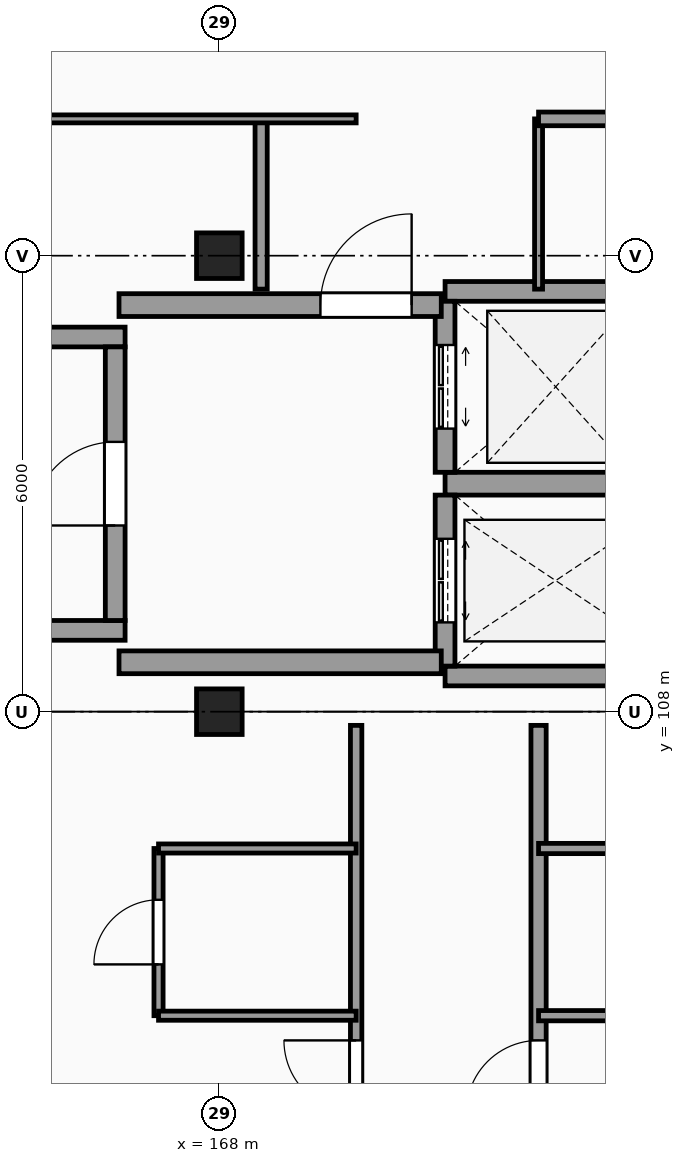
"""IFC4 building model, lengths in metres.
Left out: names, types, materials, properties, quantities, classifications, styles, units other than length and angle.
Written with IfcOpenShell. Run it as: python <this file> out.ifc"""

import sys

from ifc_helpers import new_model, si_unit, direction, frame, frame_2d, origin, origin_2d, place, context, subcontext, project, spatial, rectangle, extrude, element, fill, save


model = new_model("IFC4")
c1 = context("Model", 3, precision=1e-05, world=origin(), true_north=direction((0.0, 1.0)))
c2 = subcontext(c1, "Body", "Model", "MODEL_VIEW")
j1 = project(units=[si_unit("LENGTHUNIT", "METRE"), si_unit("PLANEANGLEUNIT", "RADIAN")], contexts=[c1])
p1 = place(None, origin())
s1 = spatial("IfcSite", under=j1, at=p1, CompositionType="ELEMENT")
p2 = place(p1, origin())
s2 = spatial("IfcBuilding", under=s1, at=p2, CompositionType="ELEMENT")
p3 = place(p2, frame((0.0, 0.0, 34.8)))
s3 = spatial("IfcBuildingStorey", under=s2, at=p3, CompositionType="ELEMENT", Elevation=34.8)
for number, where, z_axis, x_axis in (
    (1, (168.0, 108.0, 0.0), (0.0, 0.0, 1.0), (1.0, 0.0, 0.0)),
    (2, (168.0, 114.0, 0.0), (0.0, 0.0, 1.0), (1.0, 0.0, 0.0)),
):
    element("IfcColumn", number, at=place(p3, frame(where, z_axis=z_axis, x_axis=x_axis)), inside=s3, PredefinedType="COLUMN", context=c2, shape_type="SweptSolid", body=[
        extrude(rectangle(XDim=0.6, YDim=0.6, at=origin_2d()), origin(), (0.0, 0.0, 1.0), 3.3),
    ])
for number, where, z_axis, x_axis in (
    (3, (156.04, 109.07, 0.0), (0.0, 0.0, 1.0), (1.0, 0.0, 0.0)),
    (4, (156.04, 112.93, 0.0), (0.0, 0.0, 1.0), (1.0, 0.0, 0.0)),
):
    element("IfcWall", number, at=place(p3, frame(where, z_axis=z_axis, x_axis=x_axis)), inside=s3, PredefinedType="SHEAR", context=c2, shape_type="SweptSolid", body=[
        extrude(rectangle(XDim=10.72, YDim=0.26, at=frame_2d((5.36, 0.0))), origin(), (0.0, 0.0, 1.0), 3.3),
    ])
p4 = place(p3, frame((166.63, 109.2, 0.0), z_axis=(0.0, 0.0, 1.0), x_axis=(0.0, 1.0, 0.0)))
e5 = element("IfcWall", 5, at=p4, inside=s3, PredefinedType="SHEAR", context=c2, shape_type="SweptSolid", body=[
    extrude(rectangle(XDim=3.6, YDim=0.26, at=frame_2d((1.8, 0.0))), origin(), (0.0, 0.0, 1.0), 3.3),
])
p5 = place(p4, frame((1.25, 0.0, 0.0)))
e6 = element("IfcOpeningElement", 6, at=p5, cuts=e5, PredefinedType="OPENING", context=c2, shape_type="SweptSolid", body=[
    extrude(rectangle(XDim=1.1, YDim=2.15, at=frame_2d((0.55, 1.075))), frame((0.0, 0.14, 0.0), z_axis=(0.0, -1.0, 0.0), x_axis=(1.0, 0.0, 0.0)), (0.0, 0.0, 1.0), 0.28),
])
p6 = place(p3, frame((170.97, 108.47, 0.0), z_axis=(0.0, 0.0, 1.0), x_axis=(1.0, 0.0, 0.0)))
e7 = element("IfcWall", 7, at=p6, inside=s3, PredefinedType="SHEAR", context=c2, shape_type="SweptSolid", body=[
    extrude(rectangle(XDim=2.91, YDim=0.26, at=frame_2d((1.455, 0.0))), origin(), (0.0, 0.0, 1.0), 3.3),
])
p7 = place(p3, frame((170.97, 111.0, 0.0), z_axis=(0.0, 0.0, 1.0), x_axis=(1.0, 0.0, 0.0)))
e8 = element("IfcWall", 8, at=p7, inside=s3, PredefinedType="SHEAR", context=c2, shape_type="SweptSolid", body=[
    extrude(rectangle(XDim=2.91, YDim=0.3, at=frame_2d((1.455, 0.0))), origin(), (0.0, 0.0, 1.0), 3.3),
])
p8 = place(p3, frame((170.97, 108.6, 0.0), z_axis=(0.0, 0.0, 1.0), x_axis=(0.0, 1.0, 0.0)))
e9 = element("IfcWall", 9, at=p8, inside=s3, PredefinedType="SHEAR", context=c2, shape_type="SweptSolid", body=[
    extrude(rectangle(XDim=2.25, YDim=0.26, at=frame_2d((1.125, 0.0))), origin(), (0.0, 0.0, 1.0), 3.3),
])
p9 = place(p8, frame((0.575, 0.0, 0.0)))
e10 = element("IfcOpeningElement", 10, at=p9, cuts=e9, PredefinedType="OPENING", context=c2, shape_type="SweptSolid", body=[
    extrude(rectangle(XDim=1.1, YDim=2.2, at=frame_2d((0.55, 1.1))), frame((0.0, 0.14, 0.0), z_axis=(0.0, -1.0, 0.0), x_axis=(1.0, 0.0, 0.0)), (0.0, 0.0, 1.0), 0.28),
])
p10 = place(p3, frame((170.97, 113.53, 0.0), z_axis=(0.0, 0.0, 1.0), x_axis=(1.0, 0.0, 0.0)))
e11 = element("IfcWall", 11, at=p10, inside=s3, PredefinedType="SHEAR", context=c2, shape_type="SweptSolid", body=[
    extrude(rectangle(XDim=2.91, YDim=0.26, at=frame_2d((1.455, 0.0))), origin(), (0.0, 0.0, 1.0), 3.3),
])
p11 = place(p3, frame((170.97, 111.15, 0.0), z_axis=(0.0, 0.0, 1.0), x_axis=(0.0, 1.0, 0.0)))
e12 = element("IfcWall", 12, at=p11, inside=s3, PredefinedType="SHEAR", context=c2, shape_type="SweptSolid", body=[
    extrude(rectangle(XDim=2.25, YDim=0.26, at=frame_2d((1.125, 0.0))), origin(), (0.0, 0.0, 1.0), 3.3),
])
p12 = place(p11, frame((0.575, 0.0, 0.0)))
e13 = element("IfcOpeningElement", 13, at=p12, cuts=e12, PredefinedType="OPENING", context=c2, shape_type="SweptSolid", body=[
    extrude(rectangle(XDim=1.1, YDim=2.2, at=frame_2d((0.55, 1.1))), frame((0.0, 0.14, 0.0), z_axis=(0.0, -1.0, 0.0), x_axis=(1.0, 0.0, 0.0)), (0.0, 0.0, 1.0), 0.28),
])
p13 = place(p3, frame((166.68, 113.35, 0.0), z_axis=(0.0, 0.0, 1.0), x_axis=(1.0, 0.0, 0.0)))
e14 = element("IfcWall", 14, at=p13, inside=s3, PredefinedType="SHEAR", context=c2, shape_type="SweptSolid", body=[
    extrude(rectangle(XDim=4.24, YDim=0.3, at=frame_2d((2.12, 0.0))), origin(), (0.0, 0.0, 1.0), 3.3),
])
p14 = place(p13, frame((2.65, 0.0, 0.0)))
e15 = element("IfcOpeningElement", 15, at=p14, cuts=e14, PredefinedType="OPENING", context=c2, shape_type="SweptSolid", body=[
    extrude(rectangle(XDim=1.2, YDim=2.2, at=frame_2d((0.6, 1.1))), frame((0.0, 0.16, 0.0), z_axis=(0.0, -1.0, 0.0), x_axis=(1.0, 0.0, 0.0)), (0.0, 0.0, 1.0), 0.32),
])
p15 = place(p3, frame((166.68, 108.65, 0.0), z_axis=(0.0, 0.0, 1.0), x_axis=(1.0, 0.0, 0.0)))
e16 = element("IfcWall", 16, at=p15, inside=s3, PredefinedType="SHEAR", context=c2, shape_type="SweptSolid", body=[
    extrude(rectangle(XDim=4.24, YDim=0.3, at=frame_2d((2.12, 0.0))), origin(), (0.0, 0.0, 1.0), 3.3),
])
p16 = place(p3, frame((167.2, 104.0, 0.0), z_axis=(0.0, 0.0, 1.0), x_axis=(0.0, 1.0, 0.0)))
e17 = element("IfcWall", 17, at=p16, inside=s3, PredefinedType="PARTITIONING", context=c2, shape_type="SweptSolid", body=[
    extrude(rectangle(XDim=2.2, YDim=0.12, at=frame_2d((1.1, 0.0))), origin(), (0.0, 0.0, 1.0), 3.07),
])
p17 = place(p16, frame((0.675, 0.0, 0.0)))
e18 = element("IfcOpeningElement", 18, at=p17, cuts=e17, PredefinedType="OPENING", context=c2, shape_type="SweptSolid", body=[
    extrude(rectangle(XDim=0.85, YDim=2.1, at=frame_2d((0.425, 1.05))), frame((0.0, 0.07, 0.0), z_axis=(0.0, -1.0, 0.0), x_axis=(1.0, 0.0, 0.0)), (0.0, 0.0, 1.0), 0.14),
])
p18 = place(p3, frame((168.55, 113.56, 0.0), z_axis=(0.0, 0.0, 1.0), x_axis=(0.0, 1.0, 0.0)))
e19 = element("IfcWall", 19, at=p18, inside=s3, PredefinedType="PARTITIONING", context=c2, shape_type="SweptSolid", body=[
    extrude(rectangle(XDim=2.24, YDim=0.16, at=frame_2d((1.12, 0.0))), origin(), (0.0, 0.0, 1.0), 3.07),
])
p19 = place(p3, frame((169.8, 42.235, 0.0), z_axis=(0.0, 0.0, 1.0), x_axis=(0.0, 1.0, 0.0)))
e20 = element("IfcWall", 20, at=p19, inside=s3, PredefinedType="PARTITIONING", context=c2, shape_type="SweptSolid", body=[
    extrude(rectangle(XDim=65.585, YDim=0.15, at=frame_2d((32.792, 0.0))), origin(), (0.0, 0.0, 1.0), 3.07),
])
p20 = place(p19, frame((50.165, 0.0, 0.0)))
e21 = element("IfcOpeningElement", 21, at=p20, cuts=e20, PredefinedType="OPENING", context=c2, shape_type="SweptSolid", body=[
    extrude(rectangle(XDim=1.2, YDim=2.2, at=frame_2d((0.6, 1.1))), frame((0.0, 0.085, 0.0), z_axis=(0.0, -1.0, 0.0), x_axis=(1.0, 0.0, 0.0)), (0.0, 0.0, 1.0), 0.17),
])
p21 = place(p19, frame((0.44, 0.0, 0.0)))
e22 = element("IfcOpeningElement", 22, at=p21, cuts=e20, PredefinedType="OPENING", context=c2, shape_type="SweptSolid", body=[
    extrude(rectangle(XDim=0.95, YDim=2.1, at=frame_2d((0.475, 1.05))), frame((0.0, 0.085, 0.0), z_axis=(0.0, -1.0, 0.0), x_axis=(1.0, 0.0, 0.0)), (0.0, 0.0, 1.0), 0.17),
])
p22 = place(p19, frame((6.49, 0.0, 0.0)))
e23 = element("IfcOpeningElement", 23, at=p22, cuts=e20, PredefinedType="OPENING", context=c2, shape_type="SweptSolid", body=[
    extrude(rectangle(XDim=0.95, YDim=2.1, at=frame_2d((0.475, 1.05))), frame((0.0, 0.085, 0.0), z_axis=(0.0, -1.0, 0.0), x_axis=(1.0, 0.0, 0.0)), (0.0, 0.0, 1.0), 0.17),
])
p23 = place(p19, frame((12.49, 0.0, 0.0)))
e24 = element("IfcOpeningElement", 24, at=p23, cuts=e20, PredefinedType="OPENING", context=c2, shape_type="SweptSolid", body=[
    extrude(rectangle(XDim=0.95, YDim=2.1, at=frame_2d((0.475, 1.05))), frame((0.0, 0.085, 0.0), z_axis=(0.0, -1.0, 0.0), x_axis=(1.0, 0.0, 0.0)), (0.0, 0.0, 1.0), 0.17),
])
p24 = place(p19, frame((18.49, 0.0, 0.0)))
e25 = element("IfcOpeningElement", 25, at=p24, cuts=e20, PredefinedType="OPENING", context=c2, shape_type="SweptSolid", body=[
    extrude(rectangle(XDim=0.95, YDim=2.1, at=frame_2d((0.475, 1.05))), frame((0.0, 0.085, 0.0), z_axis=(0.0, -1.0, 0.0), x_axis=(1.0, 0.0, 0.0)), (0.0, 0.0, 1.0), 0.17),
])
p25 = place(p19, frame((24.49, 0.0, 0.0)))
e26 = element("IfcOpeningElement", 26, at=p25, cuts=e20, PredefinedType="OPENING", context=c2, shape_type="SweptSolid", body=[
    extrude(rectangle(XDim=0.95, YDim=2.1, at=frame_2d((0.475, 1.05))), frame((0.0, 0.085, 0.0), z_axis=(0.0, -1.0, 0.0), x_axis=(1.0, 0.0, 0.0)), (0.0, 0.0, 1.0), 0.17),
])
p26 = place(p19, frame((30.49, 0.0, 0.0)))
e27 = element("IfcOpeningElement", 27, at=p26, cuts=e20, PredefinedType="OPENING", context=c2, shape_type="SweptSolid", body=[
    extrude(rectangle(XDim=0.95, YDim=2.1, at=frame_2d((0.475, 1.05))), frame((0.0, 0.085, 0.0), z_axis=(0.0, -1.0, 0.0), x_axis=(1.0, 0.0, 0.0)), (0.0, 0.0, 1.0), 0.17),
])
p27 = place(p19, frame((54.49, 0.0, 0.0)))
e28 = element("IfcOpeningElement", 28, at=p27, cuts=e20, PredefinedType="OPENING", context=c2, shape_type="SweptSolid", body=[
    extrude(rectangle(XDim=0.95, YDim=2.1, at=frame_2d((0.475, 1.05))), frame((0.0, 0.085, 0.0), z_axis=(0.0, -1.0, 0.0), x_axis=(1.0, 0.0, 0.0)), (0.0, 0.0, 1.0), 0.17),
])
p28 = place(p19, frame((60.49, 0.0, 0.0)))
e29 = element("IfcOpeningElement", 29, at=p28, cuts=e20, PredefinedType="OPENING", context=c2, shape_type="SweptSolid", body=[
    extrude(rectangle(XDim=0.95, YDim=2.1, at=frame_2d((0.475, 1.05))), frame((0.0, 0.085, 0.0), z_axis=(0.0, -1.0, 0.0), x_axis=(1.0, 0.0, 0.0)), (0.0, 0.0, 1.0), 0.17),
])
p29 = place(p3, frame((172.2, 42.235, 0.0), z_axis=(0.0, 0.0, 1.0), x_axis=(0.0, 1.0, 0.0)))
e30 = element("IfcWall", 30, at=p29, inside=s3, PredefinedType="PARTITIONING", context=c2, shape_type="SweptSolid", body=[
    extrude(rectangle(XDim=65.585, YDim=0.2, at=frame_2d((32.792, 0.0))), origin(), (0.0, 0.0, 1.0), 3.07),
])
p30 = place(p29, frame((7.59, 0.0, 0.0)))
e31 = element("IfcOpeningElement", 31, at=p30, cuts=e30, PredefinedType="OPENING", context=c2, shape_type="SweptSolid", body=[
    extrude(rectangle(XDim=0.95, YDim=2.1, at=frame_2d((0.475, 1.05))), frame((0.0, 0.11, 0.0), z_axis=(0.0, -1.0, 0.0), x_axis=(1.0, 0.0, 0.0)), (0.0, 0.0, 1.0), 0.22),
])
p31 = place(p29, frame((12.09, 0.0, 0.0)))
e32 = element("IfcOpeningElement", 32, at=p31, cuts=e30, PredefinedType="OPENING", context=c2, shape_type="SweptSolid", body=[
    extrude(rectangle(XDim=0.95, YDim=2.1, at=frame_2d((0.475, 1.05))), frame((0.0, 0.11, 0.0), z_axis=(0.0, -1.0, 0.0), x_axis=(1.0, 0.0, 0.0)), (0.0, 0.0, 1.0), 0.22),
])
p32 = place(p29, frame((16.29, 0.0, 0.0)))
e33 = element("IfcOpeningElement", 33, at=p32, cuts=e30, PredefinedType="OPENING", context=c2, shape_type="SweptSolid", body=[
    extrude(rectangle(XDim=0.95, YDim=2.1, at=frame_2d((0.475, 1.05))), frame((0.0, 0.11, 0.0), z_axis=(0.0, -1.0, 0.0), x_axis=(1.0, 0.0, 0.0)), (0.0, 0.0, 1.0), 0.22),
])
p33 = place(p29, frame((18.49, 0.0, 0.0)))
e34 = element("IfcOpeningElement", 34, at=p33, cuts=e30, PredefinedType="OPENING", context=c2, shape_type="SweptSolid", body=[
    extrude(rectangle(XDim=0.95, YDim=2.1, at=frame_2d((0.475, 1.05))), frame((0.0, 0.11, 0.0), z_axis=(0.0, -1.0, 0.0), x_axis=(1.0, 0.0, 0.0)), (0.0, 0.0, 1.0), 0.22),
])
p34 = place(p29, frame((24.49, 0.0, 0.0)))
e35 = element("IfcOpeningElement", 35, at=p34, cuts=e30, PredefinedType="OPENING", context=c2, shape_type="SweptSolid", body=[
    extrude(rectangle(XDim=0.95, YDim=2.1, at=frame_2d((0.475, 1.05))), frame((0.0, 0.11, 0.0), z_axis=(0.0, -1.0, 0.0), x_axis=(1.0, 0.0, 0.0)), (0.0, 0.0, 1.0), 0.22),
])
p35 = place(p29, frame((34.29, 0.0, 0.0)))
e36 = element("IfcOpeningElement", 36, at=p35, cuts=e30, PredefinedType="OPENING", context=c2, shape_type="SweptSolid", body=[
    extrude(rectangle(XDim=0.95, YDim=2.1, at=frame_2d((0.475, 1.05))), frame((0.0, 0.11, 0.0), z_axis=(0.0, -1.0, 0.0), x_axis=(1.0, 0.0, 0.0)), (0.0, 0.0, 1.0), 0.22),
])
p36 = place(p29, frame((36.49, 0.0, 0.0)))
e37 = element("IfcOpeningElement", 37, at=p36, cuts=e30, PredefinedType="OPENING", context=c2, shape_type="SweptSolid", body=[
    extrude(rectangle(XDim=0.95, YDim=2.1, at=frame_2d((0.475, 1.05))), frame((0.0, 0.11, 0.0), z_axis=(0.0, -1.0, 0.0), x_axis=(1.0, 0.0, 0.0)), (0.0, 0.0, 1.0), 0.22),
])
p37 = place(p29, frame((40.89, 0.0, 0.0)))
e38 = element("IfcOpeningElement", 38, at=p37, cuts=e30, PredefinedType="OPENING", context=c2, shape_type="SweptSolid", body=[
    extrude(rectangle(XDim=0.95, YDim=2.1, at=frame_2d((0.475, 1.05))), frame((0.0, 0.11, 0.0), z_axis=(0.0, -1.0, 0.0), x_axis=(1.0, 0.0, 0.0)), (0.0, 0.0, 1.0), 0.22),
])
p38 = place(p29, frame((45.39, 0.0, 0.0)))
e39 = element("IfcOpeningElement", 39, at=p38, cuts=e30, PredefinedType="OPENING", context=c2, shape_type="SweptSolid", body=[
    extrude(rectangle(XDim=0.95, YDim=2.1, at=frame_2d((0.475, 1.05))), frame((0.0, 0.11, 0.0), z_axis=(0.0, -1.0, 0.0), x_axis=(1.0, 0.0, 0.0)), (0.0, 0.0, 1.0), 0.22),
])
p39 = place(p29, frame((54.49, 0.0, 0.0)))
e40 = element("IfcOpeningElement", 40, at=p39, cuts=e30, PredefinedType="OPENING", context=c2, shape_type="SweptSolid", body=[
    extrude(rectangle(XDim=0.95, YDim=2.1, at=frame_2d((0.475, 1.05))), frame((0.0, 0.11, 0.0), z_axis=(0.0, -1.0, 0.0), x_axis=(1.0, 0.0, 0.0)), (0.0, 0.0, 1.0), 0.22),
])
p40 = place(p29, frame((60.49, 0.0, 0.0)))
e41 = element("IfcOpeningElement", 41, at=p40, cuts=e30, PredefinedType="OPENING", context=c2, shape_type="SweptSolid", body=[
    extrude(rectangle(XDim=0.95, YDim=2.1, at=frame_2d((0.475, 1.05))), frame((0.0, 0.11, 0.0), z_axis=(0.0, -1.0, 0.0), x_axis=(1.0, 0.0, 0.0)), (0.0, 0.0, 1.0), 0.22),
])
p41 = place(p3, frame((172.2, 113.56, 0.0), z_axis=(0.0, 0.0, 1.0), x_axis=(0.0, 1.0, 0.0)))
e42 = element("IfcWall", 42, at=p41, inside=s3, PredefinedType="PARTITIONING", context=c2, shape_type="SweptSolid", body=[
    extrude(rectangle(XDim=2.24, YDim=0.105, at=frame_2d((1.12, 0.0))), origin(), (0.0, 0.0, 1.0), 3.07),
])
p42 = place(p3, frame((167.2, 104.0, 0.0), z_axis=(0.0, 0.0, 1.0), x_axis=(1.0, 0.0, 0.0)))
e43 = element("IfcWall", 43, at=p42, inside=s3, PredefinedType="PARTITIONING", context=c2, shape_type="SweptSolid", body=[
    extrude(rectangle(XDim=2.6, YDim=0.12, at=frame_2d((1.3, 0.0))), origin(), (0.0, 0.0, 1.0), 3.07),
])
p43 = place(p3, frame((172.2, 104.0, 0.0), z_axis=(0.0, 0.0, 1.0), x_axis=(1.0, 0.0, 0.0)))
e44 = element("IfcWall", 44, at=p43, inside=s3, PredefinedType="PARTITIONING", context=c2, shape_type="SweptSolid", body=[
    extrude(rectangle(XDim=2.6, YDim=0.135, at=frame_2d((1.3, 0.0))), origin(), (0.0, 0.0, 1.0), 3.07),
])
p44 = place(p3, frame((167.2, 106.2, 0.0), z_axis=(0.0, 0.0, 1.0), x_axis=(1.0, 0.0, 0.0)))
e45 = element("IfcWall", 45, at=p44, inside=s3, PredefinedType="PARTITIONING", context=c2, shape_type="SweptSolid", body=[
    extrude(rectangle(XDim=2.6, YDim=0.12, at=frame_2d((1.3, 0.0))), origin(), (0.0, 0.0, 1.0), 3.07),
])
p45 = place(p3, frame((172.2, 106.2, 0.0), z_axis=(0.0, 0.0, 1.0), x_axis=(1.0, 0.0, 0.0)))
e46 = element("IfcWall", 46, at=p45, inside=s3, PredefinedType="PARTITIONING", context=c2, shape_type="SweptSolid", body=[
    extrude(rectangle(XDim=2.6, YDim=0.135, at=frame_2d((1.3, 0.0))), origin(), (0.0, 0.0, 1.0), 3.07),
])
p46 = place(p3, frame((66.275, 115.8, 0.0), z_axis=(0.0, 0.0, 1.0), x_axis=(1.0, 0.0, 0.0)))
e47 = element("IfcWall", 47, at=p46, inside=s3, PredefinedType="PARTITIONING", context=c2, shape_type="SweptSolid", body=[
    extrude(rectangle(XDim=103.525, YDim=0.105, at=frame_2d((51.763, 0.0))), origin(), (0.0, 0.0, 1.0), 3.07),
])
p47 = place(p46, frame((80.125, 0.0, 0.0)))
e48 = element("IfcOpeningElement", 48, at=p47, cuts=e47, PredefinedType="OPENING", context=c2, shape_type="SweptSolid", body=[
    extrude(rectangle(XDim=1.2, YDim=2.2, at=frame_2d((0.6, 1.1))), frame((0.0, 0.062, 0.0), z_axis=(0.0, -1.0, 0.0), x_axis=(1.0, 0.0, 0.0)), (0.0, 0.0, 1.0), 0.125),
])
p48 = place(p46, frame((50.125, 0.0, 0.0)))
e49 = element("IfcOpeningElement", 49, at=p48, cuts=e47, PredefinedType="OPENING", context=c2, shape_type="SweptSolid", body=[
    extrude(rectangle(XDim=1.2, YDim=2.2, at=frame_2d((0.6, 1.1))), frame((0.0, 0.062, 0.0), z_axis=(0.0, -1.0, 0.0), x_axis=(1.0, 0.0, 0.0)), (0.0, 0.0, 1.0), 0.125),
])
p49 = place(p46, frame((8.975, 0.0, 0.0)))
e50 = element("IfcOpeningElement", 50, at=p49, cuts=e47, PredefinedType="OPENING", context=c2, shape_type="SweptSolid", body=[
    extrude(rectangle(XDim=1.1, YDim=2.15, at=frame_2d((0.55, 1.075))), frame((0.0, 0.062, 0.0), z_axis=(0.0, -1.0, 0.0), x_axis=(1.0, 0.0, 0.0)), (0.0, 0.0, 1.0), 0.125),
])
p50 = place(p46, frame((55.275, 0.0, 0.0)))
e51 = element("IfcOpeningElement", 51, at=p50, cuts=e47, PredefinedType="OPENING", context=c2, shape_type="SweptSolid", body=[
    extrude(rectangle(XDim=1.0, YDim=2.15, at=frame_2d((0.5, 1.075))), frame((0.0, 0.062, 0.0), z_axis=(0.0, -1.0, 0.0), x_axis=(1.0, 0.0, 0.0)), (0.0, 0.0, 1.0), 0.125),
])
p51 = place(p46, frame((62.245, 0.0, 0.0)))
e52 = element("IfcOpeningElement", 52, at=p51, cuts=e47, PredefinedType="OPENING", context=c2, shape_type="SweptSolid", body=[
    extrude(rectangle(XDim=0.96, YDim=2.15, at=frame_2d((0.48, 1.075))), frame((0.0, 0.062, 0.0), z_axis=(0.0, -1.0, 0.0), x_axis=(1.0, 0.0, 0.0)), (0.0, 0.0, 1.0), 0.125),
])
p52 = place(p46, frame((31.925, 0.0, 0.0)))
e53 = element("IfcOpeningElement", 53, at=p52, cuts=e47, PredefinedType="OPENING", context=c2, shape_type="SweptSolid", body=[
    extrude(rectangle(XDim=1.6, YDim=2.25, at=frame_2d((0.8, 1.125))), frame((0.0, 0.062, 0.0), z_axis=(0.0, -1.0, 0.0), x_axis=(1.0, 0.0, 0.0)), (0.0, 0.0, 1.0), 0.125),
])
p53 = place(p46, frame((18.55, 0.0, 0.0)))
e54 = element("IfcOpeningElement", 54, at=p53, cuts=e47, PredefinedType="OPENING", context=c2, shape_type="SweptSolid", body=[
    extrude(rectangle(XDim=0.95, YDim=2.1, at=frame_2d((0.475, 1.05))), frame((0.0, 0.062, 0.0), z_axis=(0.0, -1.0, 0.0), x_axis=(1.0, 0.0, 0.0)), (0.0, 0.0, 1.0), 0.125),
])
p54 = place(p46, frame((84.45, 0.0, 0.0)))
e55 = element("IfcOpeningElement", 55, at=p54, cuts=e47, PredefinedType="OPENING", context=c2, shape_type="SweptSolid", body=[
    extrude(rectangle(XDim=0.95, YDim=2.1, at=frame_2d((0.475, 1.05))), frame((0.0, 0.062, 0.0), z_axis=(0.0, -1.0, 0.0), x_axis=(1.0, 0.0, 0.0)), (0.0, 0.0, 1.0), 0.125),
])
p55 = place(p3, frame((172.2, 115.8, 0.0), z_axis=(0.0, 0.0, 1.0), x_axis=(1.0, 0.0, 0.0)))
e56 = element("IfcWall", 56, at=p55, inside=s3, PredefinedType="PARTITIONING", context=c2, shape_type="SweptSolid", body=[
    extrude(rectangle(XDim=4.3, YDim=0.18, at=frame_2d((2.15, 0.0))), origin(), (0.0, 0.0, 1.0), 3.07),
])
p56 = place(p55, frame((2.62, 0.0, 0.0)))
e57 = element("IfcOpeningElement", 57, at=p56, cuts=e56, PredefinedType="OPENING", context=c2, shape_type="SweptSolid", body=[
    extrude(rectangle(XDim=0.96, YDim=2.15, at=frame_2d((0.48, 1.075))), frame((0.0, 0.1, 0.0), z_axis=(0.0, -1.0, 0.0), x_axis=(1.0, 0.0, 0.0)), (0.0, 0.0, 1.0), 0.2),
])
p57 = place(p5, origin())
e58 = element("IfcDoor", 58, at=p57, inside=s3, OperationType="SINGLE_SWING_LEFT", PredefinedType="DOOR", context=c2, shape_type="SweptSolid", body=[
    extrude(rectangle(XDim=1.1, YDim=2.15, at=frame_2d((0.55, 1.075))), frame((0.0, 0.025, 0.0), z_axis=(0.0, -1.0, 0.0), x_axis=(1.0, 0.0, 0.0)), (0.0, 0.0, 1.0), 0.05),
])
fill(e6, e58)
p58 = place(p9, origin())
e59 = element("IfcDoor", 59, at=p58, inside=s3, OperationType="DOUBLE_DOOR_SLIDING", PredefinedType="DOOR", context=c2, shape_type="SweptSolid", body=[
    extrude(rectangle(XDim=1.1, YDim=2.2, at=frame_2d((0.55, 1.1))), frame((0.0, 0.025, 0.0), z_axis=(0.0, -1.0, 0.0), x_axis=(1.0, 0.0, 0.0)), (0.0, 0.0, 1.0), 0.05),
])
fill(e10, e59)
p59 = place(p12, origin())
e60 = element("IfcDoor", 60, at=p59, inside=s3, OperationType="DOUBLE_DOOR_SLIDING", PredefinedType="DOOR", context=c2, shape_type="SweptSolid", body=[
    extrude(rectangle(XDim=1.1, YDim=2.2, at=frame_2d((0.55, 1.1))), frame((0.0, 0.025, 0.0), z_axis=(0.0, -1.0, 0.0), x_axis=(1.0, 0.0, 0.0)), (0.0, 0.0, 1.0), 0.05),
])
fill(e13, e60)
p60 = place(p14, origin())
e61 = element("IfcDoor", 61, at=p60, inside=s3, OperationType="SINGLE_SWING_RIGHT", PredefinedType="DOOR", context=c2, shape_type="SweptSolid", body=[
    extrude(rectangle(XDim=1.2, YDim=2.2, at=frame_2d((0.6, 1.1))), frame((0.0, 0.025, 0.0), z_axis=(0.0, -1.0, 0.0), x_axis=(1.0, 0.0, 0.0)), (0.0, 0.0, 1.0), 0.05),
])
fill(e15, e61)
p61 = place(p40, origin())
e62 = element("IfcDoor", 62, at=p61, inside=s3, OperationType="SINGLE_SWING_LEFT", PredefinedType="DOOR", context=c2, shape_type="SweptSolid", body=[
    extrude(rectangle(XDim=0.95, YDim=2.1, at=frame_2d((0.475, 1.05))), frame((0.0, 0.025, 0.0), z_axis=(0.0, -1.0, 0.0), x_axis=(1.0, 0.0, 0.0)), (0.0, 0.0, 1.0), 0.05),
])
fill(e41, e62)
p62 = place(p17, origin())
e63 = element("IfcDoor", 63, at=p62, inside=s3, OperationType="SINGLE_SWING_LEFT", PredefinedType="DOOR", context=c2, shape_type="SweptSolid", body=[
    extrude(rectangle(XDim=0.85, YDim=2.1, at=frame_2d((0.425, 1.05))), frame((0.0, 0.025, 0.0), z_axis=(0.0, -1.0, 0.0), x_axis=(1.0, 0.0, 0.0)), (0.0, 0.0, 1.0), 0.05),
])
fill(e18, e63)
p63 = place(p28, origin())
e64 = element("IfcDoor", 64, at=p63, inside=s3, OperationType="SINGLE_SWING_RIGHT", PredefinedType="DOOR", context=c2, shape_type="SweptSolid", body=[
    extrude(rectangle(XDim=0.95, YDim=2.1, at=frame_2d((0.475, 1.05))), frame((0.0, 0.025, 0.0), z_axis=(0.0, -1.0, 0.0), x_axis=(1.0, 0.0, 0.0)), (0.0, 0.0, 1.0), 0.05),
])
fill(e29, e64)
save(model, sys.argv[1])
